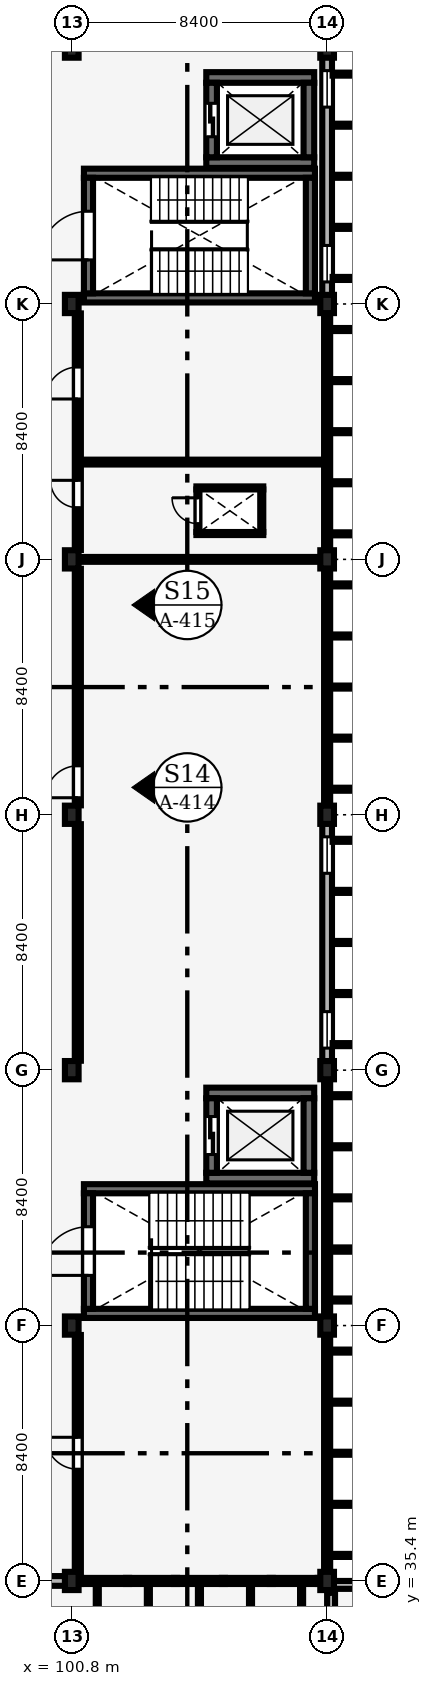
"""IFC4 building model, lengths in metres.
Left out: names, types, materials, properties, quantities, classifications, styles, units other than length and angle.
Written with IfcOpenShell. Run it as: python <this file> out.ifc"""

import sys

from ifc_helpers import new_model, si_unit, direction, frame, frame_2d, origin, origin_2d, place, context, subcontext, project, spatial, rectangle, extrude, element, fill, save


model = new_model("IFC4")
c1 = context("Model", 3, precision=1e-05, world=origin(), true_north=direction((0.0, 1.0)))
c2 = subcontext(c1, "Body", "Model", "MODEL_VIEW")
j1 = project(units=[si_unit("LENGTHUNIT", "METRE"), si_unit("PLANEANGLEUNIT", "RADIAN")], contexts=[c1])
p1 = place(None, origin())
s1 = spatial("IfcSite", under=j1, at=p1, CompositionType="ELEMENT")
p2 = place(p1, origin())
s2 = spatial("IfcBuilding", under=s1, at=p2, CompositionType="ELEMENT")
p3 = place(p2, frame((0.0, 0.0, 13.2)))
s3 = spatial("IfcBuildingStorey", under=s2, at=p3, CompositionType="ELEMENT", Elevation=13.2)
for number, where, z_axis, x_axis in (
    (1, (100.8, 35.4, 0.0), (0.0, 0.0, 1.0), (1.0, 0.0, 0.0)),
    (2, (100.8, 43.8, 0.0), (0.0, 0.0, 1.0), (1.0, 0.0, 0.0)),
    (3, (100.8, 52.2, 0.0), (0.0, 0.0, 1.0), (1.0, 0.0, 0.0)),
    (4, (100.8, 60.6, 0.0), (0.0, 0.0, 1.0), (1.0, 0.0, 0.0)),
    (5, (100.8, 69.0, 0.0), (0.0, 0.0, 1.0), (1.0, 0.0, 0.0)),
    (6, (100.8, 77.4, 0.0), (0.0, 0.0, 1.0), (1.0, 0.0, 0.0)),
    (7, (100.8, 85.8, 0.0), (0.0, 0.0, 1.0), (1.0, 0.0, 0.0)),
    (8, (109.2, 35.4, 0.0), (0.0, 0.0, 1.0), (1.0, 0.0, 0.0)),
    (9, (109.2, 43.8, 0.0), (0.0, 0.0, 1.0), (1.0, 0.0, 0.0)),
    (10, (109.2, 52.2, 0.0), (0.0, 0.0, 1.0), (1.0, 0.0, 0.0)),
    (11, (109.2, 60.6, 0.0), (0.0, 0.0, 1.0), (1.0, 0.0, 0.0)),
    (12, (109.2, 69.0, 0.0), (0.0, 0.0, 1.0), (1.0, 0.0, 0.0)),
    (13, (109.2, 77.4, 0.0), (0.0, 0.0, 1.0), (1.0, 0.0, 0.0)),
    (14, (109.2, 85.8, 0.0), (0.0, 0.0, 1.0), (1.0, 0.0, 0.0)),
):
    element("IfcColumn", number, at=place(p3, frame(where, z_axis=z_axis, x_axis=x_axis)), inside=s3, PredefinedType="COLUMN", context=c2, shape_type="SweptSolid", body=[
        extrude(rectangle(XDim=0.45, YDim=0.6, at=origin_2d()), origin(), (0.0, 0.0, 1.0), 4.2),
    ])
p4 = place(p3, frame((92.6, 35.4, 0.0), z_axis=(0.0, 0.0, 1.0), x_axis=(1.0, 0.0, 0.0)))
e15 = element("IfcWall", 15, at=p4, inside=s3, PredefinedType="SOLIDWALL", context=c2, shape_type="SweptSolid", body=[
    extrude(rectangle(XDim=8.0, YDim=0.32, at=frame_2d((4.0, 0.0))), origin(), (0.0, 0.0, 1.0), 3.43),
])
p5 = place(p4, frame((4.8, 0.0, 0.0), z_axis=(0.0, 0.0, 1.0), x_axis=(-1.0, 0.0, 0.0)))
e16 = element("IfcOpeningElement", 16, at=p5, cuts=e15, PredefinedType="OPENING", context=c2, shape_type="SweptSolid", body=[
    extrude(rectangle(XDim=1.6, YDim=2.3, at=frame_2d((0.8, 1.15))), frame((0.0, 0.17, 0.0), z_axis=(0.0, -1.0, 0.0), x_axis=(1.0, 0.0, 0.0)), (0.0, 0.0, 1.0), 0.34),
])
p6 = place(p4, frame((0.45, 0.0, 0.95)))
e17 = element("IfcOpeningElement", 17, at=p6, cuts=e15, PredefinedType="OPENING", context=c2, shape_type="SweptSolid", body=[
    extrude(rectangle(XDim=1.68, YDim=1.8, at=frame_2d((0.84, 0.9))), frame((0.0, 0.17, 0.0), z_axis=(0.0, -1.0, 0.0), x_axis=(1.0, 0.0, 0.0)), (0.0, 0.0, 1.0), 0.34),
])
p7 = place(p3, frame((109.2, 52.475, 0.0), z_axis=(0.0, 0.0, 1.0), x_axis=(0.0, 1.0, 0.0)))
e18 = element("IfcWall", 18, at=p7, inside=s3, PredefinedType="SOLIDWALL", context=c2, shape_type="SweptSolid", body=[
    extrude(rectangle(XDim=7.85, YDim=0.32, at=frame_2d((3.925, 0.0))), origin(), (0.0, 0.0, 1.0), 3.04),
])
p8 = place(p7, frame((0.45, 0.0, 0.85)))
e19 = element("IfcOpeningElement", 19, at=p8, cuts=e18, PredefinedType="OPENING", context=c2, shape_type="SweptSolid", body=[
    extrude(rectangle(XDim=1.2, YDim=1.8, at=frame_2d((0.6, 0.9))), frame((0.0, 0.17, 0.0), z_axis=(0.0, -1.0, 0.0), x_axis=(1.0, 0.0, 0.0)), (0.0, 0.0, 1.0), 0.34),
])
p9 = place(p7, frame((6.2, 0.0, 0.85)))
e20 = element("IfcOpeningElement", 20, at=p9, cuts=e18, PredefinedType="OPENING", context=c2, shape_type="SweptSolid", body=[
    extrude(rectangle(XDim=1.2, YDim=1.8, at=frame_2d((0.6, 0.9))), frame((0.0, 0.17, 0.0), z_axis=(0.0, -1.0, 0.0), x_axis=(1.0, 0.0, 0.0)), (0.0, 0.0, 1.0), 0.34),
])
p10 = place(p3, frame((109.2, 77.675, 0.0), z_axis=(0.0, 0.0, 1.0), x_axis=(0.0, 1.0, 0.0)))
e21 = element("IfcWall", 21, at=p10, inside=s3, PredefinedType="SOLIDWALL", context=c2, shape_type="SweptSolid", body=[
    extrude(rectangle(XDim=7.85, YDim=0.32, at=frame_2d((3.925, 0.0))), origin(), (0.0, 0.0, 1.0), 2.94),
])
p11 = place(p10, frame((0.45, 0.0, 0.85)))
e22 = element("IfcOpeningElement", 22, at=p11, cuts=e21, PredefinedType="OPENING", context=c2, shape_type="SweptSolid", body=[
    extrude(rectangle(XDim=1.2, YDim=1.8, at=frame_2d((0.6, 0.9))), frame((0.0, 0.17, 0.0), z_axis=(0.0, -1.0, 0.0), x_axis=(1.0, 0.0, 0.0)), (0.0, 0.0, 1.0), 0.34),
])
p12 = place(p10, frame((6.2, 0.0, 0.85)))
e23 = element("IfcOpeningElement", 23, at=p12, cuts=e21, PredefinedType="OPENING", context=c2, shape_type="SweptSolid", body=[
    extrude(rectangle(XDim=1.2, YDim=1.8, at=frame_2d((0.6, 0.9))), frame((0.0, 0.17, 0.0), z_axis=(0.0, -1.0, 0.0), x_axis=(1.0, 0.0, 0.0)), (0.0, 0.0, 1.0), 0.34),
])
p13 = place(p3, frame((109.33, 35.27, 0.0), z_axis=(0.0, 0.0, 1.0), x_axis=(1.0, 0.0, 0.0)))
e24 = element("IfcWall", 24, at=p13, inside=s3, PredefinedType="PARAPET", context=c2, shape_type="SweptSolid", body=[
    extrude(rectangle(XDim=24.94, YDim=0.26, at=frame_2d((12.47, 0.0))), origin(), (0.0, 0.0, 1.0), 0.85),
])
p14 = place(p3, frame((109.33, 18.39, 0.0), z_axis=(0.0, 0.0, 1.0), x_axis=(0.0, 1.0, 0.0)))
e25 = element("IfcWall", 25, at=p14, inside=s3, PredefinedType="PARAPET", context=c2, shape_type="SweptSolid", body=[
    extrude(rectangle(XDim=16.62, YDim=0.26, at=frame_2d((8.31, 0.0))), origin(), (0.0, 0.0, 1.0), 0.85),
])
for number, where, z_axis, x_axis in (
    (26, (101.2, 44.2, 0.0), (0.0, 0.0, 1.0), (1.0, 0.0, 0.0)),
    (27, (101.2, 48.3, 0.0), (0.0, 0.0, 1.0), (1.0, 0.0, 0.0)),
):
    element("IfcWall", number, at=place(p3, frame(where, z_axis=z_axis, x_axis=x_axis)), inside=s3, PredefinedType="SHEAR", context=c2, shape_type="SweptSolid", body=[
        extrude(rectangle(XDim=7.6, YDim=0.3, at=frame_2d((3.8, 0.0))), origin(), (0.0, 0.0, 1.0), 4.025),
    ])
p15 = place(p3, frame((101.35, 44.35, 0.0), z_axis=(0.0, 0.0, 1.0), x_axis=(0.0, 1.0, 0.0)))
e28 = element("IfcWall", 28, at=p15, inside=s3, PredefinedType="SHEAR", context=c2, shape_type="SweptSolid", body=[
    extrude(rectangle(XDim=3.8, YDim=0.3, at=frame_2d((1.9, 0.0))), origin(), (0.0, 0.0, 1.0), 4.025),
])
p16 = place(p15, frame((1.1, 0.0, 0.0)))
e29 = element("IfcOpeningElement", 29, at=p16, cuts=e28, PredefinedType="OPENING", context=c2, shape_type="SweptSolid", body=[
    extrude(rectangle(XDim=1.6, YDim=2.2, at=frame_2d((0.8, 1.1))), frame((0.0, 0.16, 0.0), z_axis=(0.0, -1.0, 0.0), x_axis=(1.0, 0.0, 0.0)), (0.0, 0.0, 1.0), 0.32),
])
p17 = place(p3, frame((108.65, 44.35, 0.0), z_axis=(0.0, 0.0, 1.0), x_axis=(0.0, 1.0, 0.0)))
e30 = element("IfcWall", 30, at=p17, inside=s3, PredefinedType="SHEAR", context=c2, shape_type="SweptSolid", body=[
    extrude(rectangle(XDim=3.8, YDim=0.3, at=frame_2d((1.9, 0.0))), origin(), (0.0, 0.0, 1.0), 4.025),
])
for number, where, z_axis, x_axis in (
    (31, (105.225, 48.65, 0.0), (0.0, 0.0, 1.0), (1.0, 0.0, 0.0)),
    (32, (105.225, 51.45, 0.0), (0.0, 0.0, 1.0), (1.0, 0.0, 0.0)),
):
    element("IfcWall", number, at=place(p3, frame(where, z_axis=z_axis, x_axis=x_axis)), inside=s3, PredefinedType="SHEAR", context=c2, shape_type="SweptSolid", body=[
        extrude(rectangle(XDim=3.55, YDim=0.35, at=frame_2d((1.775, 0.0))), origin(), (0.0, 0.0, 1.0), 3.92),
    ])
p18 = place(p3, frame((105.4, 48.825, 0.0), z_axis=(0.0, 0.0, 1.0), x_axis=(0.0, 1.0, 0.0)))
e33 = element("IfcWall", 33, at=p18, inside=s3, PredefinedType="SHEAR", context=c2, shape_type="SweptSolid", body=[
    extrude(rectangle(XDim=2.45, YDim=0.35, at=frame_2d((1.225, 0.0))), origin(), (0.0, 0.0, 1.0), 3.92),
])
p19 = place(p18, frame((0.6, 0.0, 0.0)))
e34 = element("IfcOpeningElement", 34, at=p19, cuts=e33, PredefinedType="OPENING", context=c2, shape_type="SweptSolid", body=[
    extrude(rectangle(XDim=1.25, YDim=2.25, at=frame_2d((0.625, 1.125))), frame((0.0, 0.185, 0.0), z_axis=(0.0, -1.0, 0.0), x_axis=(1.0, 0.0, 0.0)), (0.0, 0.0, 1.0), 0.37),
])
p20 = place(p3, frame((108.6, 48.825, 0.0), z_axis=(0.0, 0.0, 1.0), x_axis=(0.0, 1.0, 0.0)))
e35 = element("IfcWall", 35, at=p20, inside=s3, PredefinedType="SHEAR", context=c2, shape_type="SweptSolid", body=[
    extrude(rectangle(XDim=2.45, YDim=0.35, at=frame_2d((1.225, 0.0))), origin(), (0.0, 0.0, 1.0), 3.92),
])
for number, where, z_axis, x_axis in (
    (36, (101.2, 77.6, 0.0), (0.0, 0.0, 1.0), (1.0, 0.0, 0.0)),
    (37, (101.2, 81.7, 0.0), (0.0, 0.0, 1.0), (1.0, 0.0, 0.0)),
):
    element("IfcWall", number, at=place(p3, frame(where, z_axis=z_axis, x_axis=x_axis)), inside=s3, PredefinedType="SHEAR", context=c2, shape_type="SweptSolid", body=[
        extrude(rectangle(XDim=7.6, YDim=0.3, at=frame_2d((3.8, 0.0))), origin(), (0.0, 0.0, 1.0), 4.025),
    ])
p21 = place(p3, frame((101.35, 77.75, 0.0), z_axis=(0.0, 0.0, 1.0), x_axis=(0.0, 1.0, 0.0)))
e38 = element("IfcWall", 38, at=p21, inside=s3, PredefinedType="SHEAR", context=c2, shape_type="SweptSolid", body=[
    extrude(rectangle(XDim=3.8, YDim=0.3, at=frame_2d((1.9, 0.0))), origin(), (0.0, 0.0, 1.0), 4.025),
])
p22 = place(p21, frame((1.1, 0.0, 0.0)))
e39 = element("IfcOpeningElement", 39, at=p22, cuts=e38, PredefinedType="OPENING", context=c2, shape_type="SweptSolid", body=[
    extrude(rectangle(XDim=1.6, YDim=2.2, at=frame_2d((0.8, 1.1))), frame((0.0, 0.16, 0.0), z_axis=(0.0, -1.0, 0.0), x_axis=(1.0, 0.0, 0.0)), (0.0, 0.0, 1.0), 0.32),
])
p23 = place(p3, frame((108.65, 77.75, 0.0), z_axis=(0.0, 0.0, 1.0), x_axis=(0.0, 1.0, 0.0)))
e40 = element("IfcWall", 40, at=p23, inside=s3, PredefinedType="SHEAR", context=c2, shape_type="SweptSolid", body=[
    extrude(rectangle(XDim=3.8, YDim=0.3, at=frame_2d((1.9, 0.0))), origin(), (0.0, 0.0, 1.0), 4.025),
])
for number, where, z_axis, x_axis in (
    (41, (105.225, 82.05, 0.0), (0.0, 0.0, 1.0), (1.0, 0.0, 0.0)),
    (42, (105.225, 84.85, 0.0), (0.0, 0.0, 1.0), (1.0, 0.0, 0.0)),
):
    element("IfcWall", number, at=place(p3, frame(where, z_axis=z_axis, x_axis=x_axis)), inside=s3, PredefinedType="SHEAR", context=c2, shape_type="SweptSolid", body=[
        extrude(rectangle(XDim=3.55, YDim=0.35, at=frame_2d((1.775, 0.0))), origin(), (0.0, 0.0, 1.0), 3.92),
    ])
p24 = place(p3, frame((105.4, 82.225, 0.0), z_axis=(0.0, 0.0, 1.0), x_axis=(0.0, 1.0, 0.0)))
e43 = element("IfcWall", 43, at=p24, inside=s3, PredefinedType="SHEAR", context=c2, shape_type="SweptSolid", body=[
    extrude(rectangle(XDim=2.45, YDim=0.35, at=frame_2d((1.225, 0.0))), origin(), (0.0, 0.0, 1.0), 3.92),
])
p25 = place(p24, frame((0.675, 0.0, 0.0)))
e44 = element("IfcOpeningElement", 44, at=p25, cuts=e43, PredefinedType="OPENING", context=c2, shape_type="SweptSolid", body=[
    extrude(rectangle(XDim=1.1, YDim=2.2, at=frame_2d((0.55, 1.1))), frame((0.0, 0.185, 0.0), z_axis=(0.0, -1.0, 0.0), x_axis=(1.0, 0.0, 0.0)), (0.0, 0.0, 1.0), 0.37),
])
p26 = place(p3, frame((108.6, 82.225, 0.0), z_axis=(0.0, 0.0, 1.0), x_axis=(0.0, 1.0, 0.0)))
e45 = element("IfcWall", 45, at=p26, inside=s3, PredefinedType="SHEAR", context=c2, shape_type="SweptSolid", body=[
    extrude(rectangle(XDim=2.45, YDim=0.35, at=frame_2d((1.225, 0.0))), origin(), (0.0, 0.0, 1.0), 3.92),
])
for number, where, z_axis, x_axis in (
    (46, (104.9, 69.85, 0.0), (0.0, 0.0, 1.0), (1.0, 0.0, 0.0)),
    (47, (104.9, 71.35, 0.0), (0.0, 0.0, 1.0), (1.0, 0.0, 0.0)),
):
    element("IfcWall", number, at=place(p3, frame(where, z_axis=z_axis, x_axis=x_axis)), inside=s3, PredefinedType="PARTITIONING", context=c2, shape_type="SweptSolid", body=[
        extrude(rectangle(XDim=2.2, YDim=0.1, at=frame_2d((1.1, 0.0))), origin(), (0.0, 0.0, 1.0), 3.9),
    ])
p27 = place(p3, frame((104.95, 69.9, 0.0), z_axis=(0.0, 0.0, 1.0), x_axis=(0.0, 1.0, 0.0)))
e48 = element("IfcWall", 48, at=p27, inside=s3, PredefinedType="PARTITIONING", context=c2, shape_type="SweptSolid", body=[
    extrude(rectangle(XDim=1.4, YDim=0.1, at=frame_2d((0.7, 0.0))), origin(), (0.0, 0.0, 1.0), 3.9),
])
p28 = place(p27, frame((0.275, 0.0, 0.0)))
e49 = element("IfcOpeningElement", 49, at=p28, cuts=e48, PredefinedType="OPENING", context=c2, shape_type="SweptSolid", body=[
    extrude(rectangle(XDim=0.85, YDim=2.05, at=frame_2d((0.425, 1.025))), frame((0.0, 0.06, 0.0), z_axis=(0.0, -1.0, 0.0), x_axis=(1.0, 0.0, 0.0)), (0.0, 0.0, 1.0), 0.12),
])
p29 = place(p3, frame((107.05, 69.9, 0.0), z_axis=(0.0, 0.0, 1.0), x_axis=(0.0, 1.0, 0.0)))
e50 = element("IfcWall", 50, at=p29, inside=s3, PredefinedType="PARTITIONING", context=c2, shape_type="SweptSolid", body=[
    extrude(rectangle(XDim=1.4, YDim=0.1, at=frame_2d((0.7, 0.0))), origin(), (0.0, 0.0, 1.0), 3.9),
])
p30 = place(p3, frame((101.0, 35.565, 0.0), z_axis=(0.0, 0.0, 1.0), x_axis=(0.0, 1.0, 0.0)))
e51 = element("IfcWall", 51, at=p30, inside=s3, PredefinedType="PARTITIONING", context=c2, shape_type="SweptSolid", body=[
    extrude(rectangle(XDim=7.925, YDim=0.2, at=frame_2d((3.962, 0.0))), origin(), (0.0, 0.0, 1.0), 3.43),
])
p31 = place(p30, frame((3.51, 0.0, 0.0)))
e52 = element("IfcOpeningElement", 52, at=p31, cuts=e51, PredefinedType="OPENING", context=c2, shape_type="SweptSolid", body=[
    extrude(rectangle(XDim=1.05, YDim=2.2, at=frame_2d((0.525, 1.1))), frame((0.0, 0.11, 0.0), z_axis=(0.0, -1.0, 0.0), x_axis=(1.0, 0.0, 0.0)), (0.0, 0.0, 1.0), 0.22),
])
p32 = place(p3, frame((101.105, 69.0, 0.0), z_axis=(0.0, 0.0, 1.0), x_axis=(1.0, 0.0, 0.0)))
e53 = element("IfcWall", 53, at=p32, inside=s3, PredefinedType="PARTITIONING", context=c2, shape_type="SweptSolid", body=[
    extrude(rectangle(XDim=7.99, YDim=0.16, at=frame_2d((3.995, 0.0))), origin(), (0.0, 0.0, 1.0), 3.34),
])
p33 = place(p3, frame((101.105, 72.2, 0.0), z_axis=(0.0, 0.0, 1.0), x_axis=(1.0, 0.0, 0.0)))
e54 = element("IfcWall", 54, at=p33, inside=s3, PredefinedType="PARTITIONING", context=c2, shape_type="SweptSolid", body=[
    extrude(rectangle(XDim=7.99, YDim=0.16, at=frame_2d((3.995, 0.0))), origin(), (0.0, 0.0, 1.0), 3.9),
])
p34 = place(p3, frame((101.0, 52.51, 0.0), z_axis=(0.0, 0.0, 1.0), x_axis=(0.0, 1.0, 0.0)))
e55 = element("IfcWall", 55, at=p34, inside=s3, PredefinedType="PARTITIONING", context=c2, shape_type="SweptSolid", body=[
    extrude(rectangle(XDim=7.78, YDim=0.2, at=frame_2d((3.89, 0.0))), origin(), (0.0, 0.0, 1.0), 3.24),
])
p35 = place(p3, frame((101.0, 60.91, 0.0), z_axis=(0.0, 0.0, 1.0), x_axis=(0.0, 1.0, 0.0)))
e56 = element("IfcWall", 56, at=p35, inside=s3, PredefinedType="PARTITIONING", context=c2, shape_type="SweptSolid", body=[
    extrude(rectangle(XDim=7.78, YDim=0.2, at=frame_2d((3.89, 0.0))), origin(), (0.0, 0.0, 1.0), 3.29),
])
p36 = place(p35, frame((0.25, 0.0, 0.0)))
e57 = element("IfcOpeningElement", 57, at=p36, cuts=e56, PredefinedType="OPENING", context=c2, shape_type="SweptSolid", body=[
    extrude(rectangle(XDim=1.05, YDim=2.2, at=frame_2d((0.525, 1.1))), frame((0.0, 0.11, 0.0), z_axis=(0.0, -1.0, 0.0), x_axis=(1.0, 0.0, 0.0)), (0.0, 0.0, 1.0), 0.22),
])
p37 = place(p3, frame((101.0, 69.31, 0.0), z_axis=(0.0, 0.0, 1.0), x_axis=(0.0, 1.0, 0.0)))
e58 = element("IfcWall", 58, at=p37, inside=s3, PredefinedType="PARTITIONING", context=c2, shape_type="SweptSolid", body=[
    extrude(rectangle(XDim=7.78, YDim=0.2, at=frame_2d((3.89, 0.0))), origin(), (0.0, 0.0, 1.0), 3.24),
])
p38 = place(p37, frame((1.39, 0.0, 0.0)))
e59 = element("IfcOpeningElement", 59, at=p38, cuts=e58, PredefinedType="OPENING", context=c2, shape_type="SweptSolid", body=[
    extrude(rectangle(XDim=0.9, YDim=2.1, at=frame_2d((0.45, 1.05))), frame((0.0, 0.11, 0.0), z_axis=(0.0, -1.0, 0.0), x_axis=(1.0, 0.0, 0.0)), (0.0, 0.0, 1.0), 0.22),
])
p39 = place(p37, frame((4.965, 0.0, 0.0)))
e60 = element("IfcOpeningElement", 60, at=p39, cuts=e58, PredefinedType="OPENING", context=c2, shape_type="SweptSolid", body=[
    extrude(rectangle(XDim=1.05, YDim=2.2, at=frame_2d((0.525, 1.1))), frame((0.0, 0.11, 0.0), z_axis=(0.0, -1.0, 0.0), x_axis=(1.0, 0.0, 0.0)), (0.0, 0.0, 1.0), 0.22),
])
p40 = place(p8, origin())
e61 = element("IfcWindow", 61, at=p40, inside=s3, PartitioningType="SINGLE_PANEL", PredefinedType="WINDOW", context=c2, shape_type="SweptSolid", body=[
    extrude(rectangle(XDim=1.2, YDim=1.8, at=frame_2d((0.6, 0.9))), frame((0.0, 0.03, 0.0), z_axis=(0.0, -1.0, 0.0), x_axis=(1.0, 0.0, 0.0)), (0.0, 0.0, 1.0), 0.06),
])
fill(e19, e61)
p41 = place(p9, origin())
e62 = element("IfcWindow", 62, at=p41, inside=s3, PartitioningType="SINGLE_PANEL", PredefinedType="WINDOW", context=c2, shape_type="SweptSolid", body=[
    extrude(rectangle(XDim=1.2, YDim=1.8, at=frame_2d((0.6, 0.9))), frame((0.0, 0.03, 0.0), z_axis=(0.0, -1.0, 0.0), x_axis=(1.0, 0.0, 0.0)), (0.0, 0.0, 1.0), 0.06),
])
fill(e20, e62)
p42 = place(p11, origin())
e63 = element("IfcWindow", 63, at=p42, inside=s3, PartitioningType="SINGLE_PANEL", PredefinedType="WINDOW", context=c2, shape_type="SweptSolid", body=[
    extrude(rectangle(XDim=1.2, YDim=1.8, at=frame_2d((0.6, 0.9))), frame((0.0, 0.03, 0.0), z_axis=(0.0, -1.0, 0.0), x_axis=(1.0, 0.0, 0.0)), (0.0, 0.0, 1.0), 0.06),
])
fill(e22, e63)
p43 = place(p12, origin())
e64 = element("IfcWindow", 64, at=p43, inside=s3, PartitioningType="SINGLE_PANEL", PredefinedType="WINDOW", context=c2, shape_type="SweptSolid", body=[
    extrude(rectangle(XDim=1.2, YDim=1.8, at=frame_2d((0.6, 0.9))), frame((0.0, 0.03, 0.0), z_axis=(0.0, -1.0, 0.0), x_axis=(1.0, 0.0, 0.0)), (0.0, 0.0, 1.0), 0.06),
])
fill(e23, e64)
p44 = place(p16, origin())
e65 = element("IfcDoor", 65, at=p44, inside=s3, OperationType="DOUBLE_DOOR_SINGLE_SWING", PredefinedType="DOOR", context=c2, shape_type="SweptSolid", body=[
    extrude(rectangle(XDim=1.6, YDim=2.2, at=frame_2d((0.8, 1.1))), frame((0.0, 0.025, 0.0), z_axis=(0.0, -1.0, 0.0), x_axis=(1.0, 0.0, 0.0)), (0.0, 0.0, 1.0), 0.05),
])
fill(e29, e65)
p45 = place(p19, origin())
e66 = element("IfcDoor", 66, at=p45, inside=s3, OperationType="DOUBLE_DOOR_SLIDING", PredefinedType="DOOR", context=c2, shape_type="SweptSolid", body=[
    extrude(rectangle(XDim=1.25, YDim=2.25, at=frame_2d((0.625, 1.125))), frame((0.0, 0.025, 0.0), z_axis=(0.0, -1.0, 0.0), x_axis=(1.0, 0.0, 0.0)), (0.0, 0.0, 1.0), 0.05),
])
fill(e34, e66)
p46 = place(p22, origin())
e67 = element("IfcDoor", 67, at=p46, inside=s3, OperationType="DOUBLE_DOOR_SINGLE_SWING", PredefinedType="DOOR", context=c2, shape_type="SweptSolid", body=[
    extrude(rectangle(XDim=1.6, YDim=2.2, at=frame_2d((0.8, 1.1))), frame((0.0, 0.025, 0.0), z_axis=(0.0, -1.0, 0.0), x_axis=(1.0, 0.0, 0.0)), (0.0, 0.0, 1.0), 0.05),
])
fill(e39, e67)
p47 = place(p25, origin())
e68 = element("IfcDoor", 68, at=p47, inside=s3, OperationType="DOUBLE_DOOR_SLIDING", PredefinedType="DOOR", context=c2, shape_type="SweptSolid", body=[
    extrude(rectangle(XDim=1.1, YDim=2.2, at=frame_2d((0.55, 1.1))), frame((0.0, 0.025, 0.0), z_axis=(0.0, -1.0, 0.0), x_axis=(1.0, 0.0, 0.0)), (0.0, 0.0, 1.0), 0.05),
])
fill(e44, e68)
p48 = place(p28, origin())
e69 = element("IfcDoor", 69, at=p48, inside=s3, OperationType="SINGLE_SWING_RIGHT", PredefinedType="DOOR", context=c2, shape_type="SweptSolid", body=[
    extrude(rectangle(XDim=0.85, YDim=2.05, at=frame_2d((0.425, 1.025))), frame((0.0, 0.025, 0.0), z_axis=(0.0, -1.0, 0.0), x_axis=(1.0, 0.0, 0.0)), (0.0, 0.0, 1.0), 0.05),
])
fill(e49, e69)
p49 = place(p31, origin())
e70 = element("IfcDoor", 70, at=p49, inside=s3, OperationType="SINGLE_SWING_RIGHT", PredefinedType="DOOR", context=c2, shape_type="SweptSolid", body=[
    extrude(rectangle(XDim=1.05, YDim=2.2, at=frame_2d((0.525, 1.1))), frame((0.0, 0.025, 0.0), z_axis=(0.0, -1.0, 0.0), x_axis=(1.0, 0.0, 0.0)), (0.0, 0.0, 1.0), 0.05),
])
fill(e52, e70)
p50 = place(p36, origin())
e71 = element("IfcDoor", 71, at=p50, inside=s3, OperationType="SINGLE_SWING_LEFT", PredefinedType="DOOR", context=c2, shape_type="SweptSolid", body=[
    extrude(rectangle(XDim=1.05, YDim=2.2, at=frame_2d((0.525, 1.1))), frame((0.0, 0.025, 0.0), z_axis=(0.0, -1.0, 0.0), x_axis=(1.0, 0.0, 0.0)), (0.0, 0.0, 1.0), 0.05),
])
fill(e57, e71)
p51 = place(p38, origin())
e72 = element("IfcDoor", 72, at=p51, inside=s3, OperationType="SINGLE_SWING_RIGHT", PredefinedType="DOOR", context=c2, shape_type="SweptSolid", body=[
    extrude(rectangle(XDim=0.9, YDim=2.1, at=frame_2d((0.45, 1.05))), frame((0.0, 0.025, 0.0), z_axis=(0.0, -1.0, 0.0), x_axis=(1.0, 0.0, 0.0)), (0.0, 0.0, 1.0), 0.05),
])
fill(e59, e72)
p52 = place(p39, origin())
e73 = element("IfcDoor", 73, at=p52, inside=s3, OperationType="SINGLE_SWING_LEFT", PredefinedType="DOOR", context=c2, shape_type="SweptSolid", body=[
    extrude(rectangle(XDim=1.05, YDim=2.2, at=frame_2d((0.525, 1.1))), frame((0.0, 0.025, 0.0), z_axis=(0.0, -1.0, 0.0), x_axis=(1.0, 0.0, 0.0)), (0.0, 0.0, 1.0), 0.05),
])
fill(e60, e73)
save(model, sys.argv[1])
